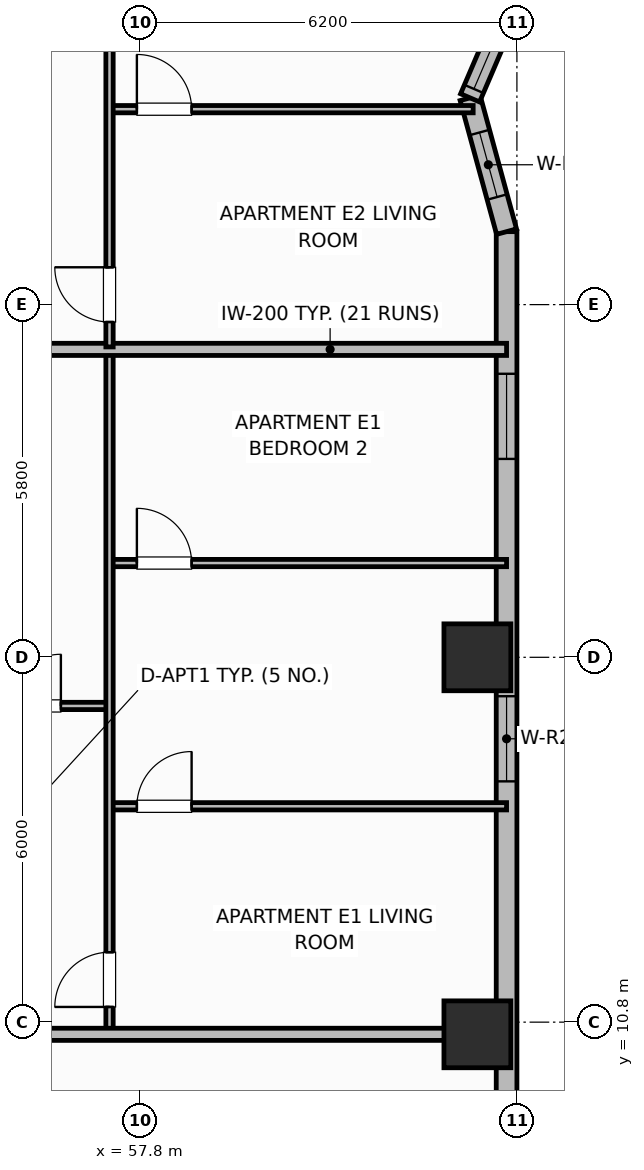
"""IFC4 building model, lengths in metres.
Left out: names, types, materials, properties, quantities, classifications, styles, units other than length and angle.
Written with IfcOpenShell. Run it as: python <this file> out.ifc"""

import sys

from ifc_helpers import new_model, si_unit, direction, frame, frame_2d, origin, origin_2d, place, context, subcontext, project, spatial, rectangle, extrude, element, fill, save


model = new_model("IFC4")
c1 = context("Model", 3, precision=1e-05, world=origin(), true_north=direction((0.0, 1.0)))
c2 = subcontext(c1, "Body", "Model", "MODEL_VIEW")
j1 = project(units=[si_unit("LENGTHUNIT", "METRE"), si_unit("PLANEANGLEUNIT", "RADIAN")], contexts=[c1])
p1 = place(None, origin())
s1 = spatial("IfcSite", under=j1, at=p1, CompositionType="ELEMENT")
p2 = place(p1, origin())
s2 = spatial("IfcBuilding", under=s1, at=p2, CompositionType="ELEMENT")
p3 = place(p2, frame((0.0, 0.0, 88.3)))
s3 = spatial("IfcBuildingStorey", under=s2, at=p3, CompositionType="ELEMENT", Elevation=88.3)
for number, where, z_axis, x_axis in (
    (1, (63.35, 10.6, 0.0), (0.0, 0.0, 1.0), (1.0, 0.0, 0.0)),
    (2, (63.35, 16.8, 0.0), (0.0, 0.0, 1.0), (1.0, 0.0, 0.0)),
):
    element("IfcColumn", number, at=place(p3, frame(where, z_axis=z_axis, x_axis=x_axis)), inside=s3, PredefinedType="COLUMN", context=c2, shape_type="SweptSolid", body=[
        extrude(rectangle(XDim=1.1, YDim=1.1, at=origin_2d()), origin(), (0.0, 0.0, 1.0), 3.7),
    ])
p4 = place(p3, frame((63.83, 9.0, 0.0), z_axis=(0.0, 0.0, 1.0), x_axis=(0.0, 1.0, 0.0)))
e3 = element("IfcWall", 3, at=p4, inside=s3, PredefinedType="SOLIDWALL", context=c2, shape_type="SweptSolid", body=[
    extrude(rectangle(XDim=14.8, YDim=0.34, at=frame_2d((7.4, 0.0))), origin(), (0.0, 0.0, 1.0), 2.7),
])
p5 = place(p4, frame((5.76, 0.0, 0.69)))
e4 = element("IfcOpeningElement", 4, at=p5, cuts=e3, PredefinedType="OPENING", context=c2, shape_type="SweptSolid", body=[
    extrude(rectangle(XDim=1.4, YDim=1.85, at=frame_2d((0.7, 0.925))), frame((0.0, 0.18, 0.0), z_axis=(0.0, -1.0, 0.0), x_axis=(1.0, 0.0, 0.0)), (0.0, 0.0, 1.0), 0.36),
])
p6 = place(p4, frame((11.062, 0.0, 0.73)))
e5 = element("IfcOpeningElement", 5, at=p6, cuts=e3, PredefinedType="OPENING", context=c2, shape_type="SweptSolid", body=[
    extrude(rectangle(XDim=1.4, YDim=1.85, at=frame_2d((0.7, 0.925))), frame((0.0, 0.18, 0.0), z_axis=(0.0, -1.0, 0.0), x_axis=(1.0, 0.0, 0.0)), (0.0, 0.0, 1.0), 0.36),
])
p7 = place(p3, frame((63.83, 23.8, 0.0), z_axis=(0.0, 0.0, 1.0), x_axis=(-0.263162701705, 0.964751466665, 0.0)))
e6 = element("IfcWall", 6, at=p7, inside=s3, PredefinedType="SOLIDWALL", context=c2, shape_type="SweptSolid", body=[
    extrude(rectangle(XDim=2.28, YDim=0.34, at=frame_2d((1.14, 0.0))), origin(), (0.0, 0.0, 1.0), 2.7),
])
p8 = place(p7, frame((0.59, 0.0, 0.89)))
e7 = element("IfcOpeningElement", 7, at=p8, cuts=e6, PredefinedType="OPENING", context=c2, shape_type="SweptSolid", body=[
    extrude(rectangle(XDim=1.1, YDim=1.65, at=frame_2d((0.55, 0.825))), frame((0.0, 0.18, 0.0), z_axis=(0.0, -1.0, 0.0), x_axis=(1.0, 0.0, 0.0)), (0.0, 0.0, 1.0), 0.36),
])
p9 = place(p3, frame((63.23, 26.0, 0.0), z_axis=(0.0, 0.0, 1.0), x_axis=(0.39399667932, 0.919111862988, 0.0)))
e8 = element("IfcWall", 8, at=p9, inside=s3, PredefinedType="SOLIDWALL", context=c2, shape_type="SweptSolid", body=[
    extrude(rectangle(XDim=1.523, YDim=0.34, at=frame_2d((0.762, 0.0))), origin(), (0.0, 0.0, 1.0), 2.7),
])
p10 = place(p9, frame((0.16, 0.0, 0.89)))
e9 = element("IfcOpeningElement", 9, at=p10, cuts=e8, PredefinedType="OPENING", context=c2, shape_type="SweptSolid", body=[
    extrude(rectangle(XDim=1.1, YDim=1.65, at=frame_2d((0.55, 0.825))), frame((0.0, 0.18, 0.0), z_axis=(0.0, -1.0, 0.0), x_axis=(1.0, 0.0, 0.0)), (0.0, 0.0, 1.0), 0.36),
])
p11 = place(p3, frame((55.05, 16.0, 0.0), z_axis=(0.0, 0.0, 1.0), x_axis=(1.0, 0.0, 0.0)))
e10 = element("IfcWall", 10, at=p11, inside=s3, PredefinedType="PARTITIONING", context=c2, shape_type="SweptSolid", body=[
    extrude(rectangle(XDim=2.25, YDim=0.12, at=frame_2d((1.125, 0.0))), origin(), (0.0, 0.0, 1.0), 2.53),
])
p12 = place(p11, frame((0.6, 0.0, 0.0)))
e11 = element("IfcOpeningElement", 11, at=p12, cuts=e10, PredefinedType="OPENING", context=c2, shape_type="SweptSolid", body=[
    extrude(rectangle(XDim=0.85, YDim=2.1, at=frame_2d((0.425, 1.05))), frame((0.0, 0.07, 0.0), z_axis=(0.0, -1.0, 0.0), x_axis=(1.0, 0.0, 0.0)), (0.0, 0.0, 1.0), 0.14),
])
p13 = place(p3, frame((57.3, 14.35, 0.0), z_axis=(0.0, 0.0, 1.0), x_axis=(1.0, 0.0, 0.0)))
e12 = element("IfcWall", 12, at=p13, inside=s3, PredefinedType="PARTITIONING", context=c2, shape_type="SweptSolid", body=[
    extrude(rectangle(XDim=6.53, YDim=0.12, at=frame_2d((3.265, 0.0))), origin(), (0.0, 0.0, 1.0), 2.53),
])
p14 = place(p13, frame((0.45, 0.0, 0.0)))
e13 = element("IfcOpeningElement", 13, at=p14, cuts=e12, PredefinedType="OPENING", context=c2, shape_type="SweptSolid", body=[
    extrude(rectangle(XDim=0.9, YDim=2.1, at=frame_2d((0.45, 1.05))), frame((0.0, 0.07, 0.0), z_axis=(0.0, -1.0, 0.0), x_axis=(1.0, 0.0, 0.0)), (0.0, 0.0, 1.0), 0.14),
])
p15 = place(p3, frame((57.3, 18.35, 0.0), z_axis=(0.0, 0.0, 1.0), x_axis=(1.0, 0.0, 0.0)))
e14 = element("IfcWall", 14, at=p15, inside=s3, PredefinedType="PARTITIONING", context=c2, shape_type="SweptSolid", body=[
    extrude(rectangle(XDim=6.53, YDim=0.12, at=frame_2d((3.265, 0.0))), origin(), (0.0, 0.0, 1.0), 2.53),
])
p16 = place(p15, frame((0.45, 0.0, 0.0)))
e15 = element("IfcOpeningElement", 15, at=p16, cuts=e14, PredefinedType="OPENING", context=c2, shape_type="SweptSolid", body=[
    extrude(rectangle(XDim=0.9, YDim=2.1, at=frame_2d((0.45, 1.05))), frame((0.0, 0.07, 0.0), z_axis=(0.0, -1.0, 0.0), x_axis=(1.0, 0.0, 0.0)), (0.0, 0.0, 1.0), 0.14),
])
p17 = place(p3, frame((57.3, 10.64, 0.0), z_axis=(0.0, 0.0, 1.0), x_axis=(0.0, 1.0, 0.0)))
e16 = element("IfcWall", 16, at=p17, inside=s3, PredefinedType="PARTITIONING", context=c2, shape_type="SweptSolid", body=[
    extrude(rectangle(XDim=11.184, YDim=0.12, at=frame_2d((5.592, 0.0))), origin(), (0.0, 0.0, 1.0), 2.53),
])
p18 = place(p17, frame((0.41, 0.0, 0.0)))
e17 = element("IfcOpeningElement", 17, at=p18, cuts=e16, PredefinedType="OPENING", context=c2, shape_type="SweptSolid", body=[
    extrude(rectangle(XDim=0.9, YDim=2.1, at=frame_2d((0.45, 1.05))), frame((0.0, 0.07, 0.0), z_axis=(0.0, -1.0, 0.0), x_axis=(1.0, 0.0, 0.0)), (0.0, 0.0, 1.0), 0.14),
])
p19 = place(p3, frame((55.05, 21.864, 0.0), z_axis=(0.0, 0.0, 1.0), x_axis=(1.0, 0.0, 0.0)))
e18 = element("IfcWall", 18, at=p19, inside=s3, PredefinedType="PARTITIONING", context=c2, shape_type="SweptSolid", body=[
    extrude(rectangle(XDim=8.78, YDim=0.2, at=frame_2d((4.39, 0.0))), origin(), (0.0, 0.0, 1.0), 2.53),
])
p20 = place(p3, frame((57.3, 25.814, 0.0), z_axis=(0.0, 0.0, 1.0), x_axis=(1.0, 0.0, 0.0)))
e19 = element("IfcWall", 19, at=p20, inside=s3, PredefinedType="PARTITIONING", context=c2, shape_type="SweptSolid", body=[
    extrude(rectangle(XDim=5.981, YDim=0.12, at=frame_2d((2.99, 0.0))), origin(), (0.0, 0.0, 1.0), 2.53),
])
p21 = place(p20, frame((0.45, 0.0, 0.0)))
e20 = element("IfcOpeningElement", 20, at=p21, cuts=e19, PredefinedType="OPENING", context=c2, shape_type="SweptSolid", body=[
    extrude(rectangle(XDim=0.9, YDim=2.1, at=frame_2d((0.45, 1.05))), frame((0.0, 0.07, 0.0), z_axis=(0.0, -1.0, 0.0), x_axis=(1.0, 0.0, 0.0)), (0.0, 0.0, 1.0), 0.14),
])
p22 = place(p3, frame((57.3, 21.904, 0.0), z_axis=(0.0, 0.0, 1.0), x_axis=(0.0, 1.0, 0.0)))
e21 = element("IfcWall", 21, at=p22, inside=s3, PredefinedType="PARTITIONING", context=c2, shape_type="SweptSolid", body=[
    extrude(rectangle(XDim=11.756, YDim=0.12, at=frame_2d((5.878, 0.0))), origin(), (0.0, 0.0, 1.0), 2.53),
])
p23 = place(p22, frame((0.41, 0.0, 0.0)))
e22 = element("IfcOpeningElement", 22, at=p23, cuts=e21, PredefinedType="OPENING", context=c2, shape_type="SweptSolid", body=[
    extrude(rectangle(XDim=0.9, YDim=2.1, at=frame_2d((0.45, 1.05))), frame((0.0, 0.07, 0.0), z_axis=(0.0, -1.0, 0.0), x_axis=(1.0, 0.0, 0.0)), (0.0, 0.0, 1.0), 0.14),
])
p24 = place(p3, frame((55.05, 10.6, 0.0), z_axis=(0.0, 0.0, 1.0), x_axis=(1.0, 0.0, 0.0)))
e23 = element("IfcWall", 23, at=p24, inside=s3, PredefinedType="PARTITIONING", context=c2, shape_type="SweptSolid", body=[
    extrude(rectangle(XDim=8.36, YDim=0.2, at=frame_2d((4.18, 0.0))), origin(), (0.0, 0.0, 1.0), 2.53),
])
p25 = place(p5, origin())
e24 = element("IfcWindow", 24, at=p25, inside=s3, PartitioningType="SINGLE_PANEL", PredefinedType="WINDOW", context=c2, shape_type="SweptSolid", body=[
    extrude(rectangle(XDim=1.4, YDim=1.85, at=frame_2d((0.7, 0.925))), frame((0.0, 0.03, 0.0), z_axis=(0.0, -1.0, 0.0), x_axis=(1.0, 0.0, 0.0)), (0.0, 0.0, 1.0), 0.06),
])
fill(e4, e24)
p26 = place(p6, origin())
e25 = element("IfcWindow", 25, at=p26, inside=s3, PartitioningType="SINGLE_PANEL", PredefinedType="WINDOW", context=c2, shape_type="SweptSolid", body=[
    extrude(rectangle(XDim=1.4, YDim=1.85, at=frame_2d((0.7, 0.925))), frame((0.0, 0.03, 0.0), z_axis=(0.0, -1.0, 0.0), x_axis=(1.0, 0.0, 0.0)), (0.0, 0.0, 1.0), 0.06),
])
fill(e5, e25)
p27 = place(p8, origin())
e26 = element("IfcWindow", 26, at=p27, inside=s3, PartitioningType="SINGLE_PANEL", PredefinedType="WINDOW", context=c2, shape_type="SweptSolid", body=[
    extrude(rectangle(XDim=1.1, YDim=1.65, at=frame_2d((0.55, 0.825))), frame((0.0, 0.03, 0.0), z_axis=(0.0, -1.0, 0.0), x_axis=(1.0, 0.0, 0.0)), (0.0, 0.0, 1.0), 0.06),
])
fill(e7, e26)
p28 = place(p10, origin())
e27 = element("IfcWindow", 27, at=p28, inside=s3, PartitioningType="SINGLE_PANEL", PredefinedType="WINDOW", context=c2, shape_type="SweptSolid", body=[
    extrude(rectangle(XDim=1.1, YDim=1.65, at=frame_2d((0.55, 0.825))), frame((0.0, 0.03, 0.0), z_axis=(0.0, -1.0, 0.0), x_axis=(1.0, 0.0, 0.0)), (0.0, 0.0, 1.0), 0.06),
])
fill(e9, e27)
p29 = place(p12, origin())
e28 = element("IfcDoor", 28, at=p29, inside=s3, OperationType="SINGLE_SWING_RIGHT", PredefinedType="DOOR", context=c2, shape_type="SweptSolid", body=[
    extrude(rectangle(XDim=0.85, YDim=2.1, at=frame_2d((0.425, 1.05))), frame((0.0, 0.025, 0.0), z_axis=(0.0, -1.0, 0.0), x_axis=(1.0, 0.0, 0.0)), (0.0, 0.0, 1.0), 0.05),
])
fill(e11, e28)
p30 = place(p14, origin())
e29 = element("IfcDoor", 29, at=p30, inside=s3, OperationType="SINGLE_SWING_RIGHT", PredefinedType="DOOR", context=c2, shape_type="SweptSolid", body=[
    extrude(rectangle(XDim=0.9, YDim=2.1, at=frame_2d((0.45, 1.05))), frame((0.0, 0.025, 0.0), z_axis=(0.0, -1.0, 0.0), x_axis=(1.0, 0.0, 0.0)), (0.0, 0.0, 1.0), 0.05),
])
fill(e13, e29)
p31 = place(p16, origin())
e30 = element("IfcDoor", 30, at=p31, inside=s3, OperationType="SINGLE_SWING_LEFT", PredefinedType="DOOR", context=c2, shape_type="SweptSolid", body=[
    extrude(rectangle(XDim=0.9, YDim=2.1, at=frame_2d((0.45, 1.05))), frame((0.0, 0.025, 0.0), z_axis=(0.0, -1.0, 0.0), x_axis=(1.0, 0.0, 0.0)), (0.0, 0.0, 1.0), 0.05),
])
fill(e15, e30)
p32 = place(p18, origin())
e31 = element("IfcDoor", 31, at=p32, inside=s3, OperationType="SINGLE_SWING_LEFT", PredefinedType="DOOR", context=c2, shape_type="SweptSolid", body=[
    extrude(rectangle(XDim=0.9, YDim=2.1, at=frame_2d((0.45, 1.05))), frame((0.0, 0.025, 0.0), z_axis=(0.0, -1.0, 0.0), x_axis=(1.0, 0.0, 0.0)), (0.0, 0.0, 1.0), 0.05),
])
fill(e17, e31)
p33 = place(p21, origin())
e32 = element("IfcDoor", 32, at=p33, inside=s3, OperationType="SINGLE_SWING_LEFT", PredefinedType="DOOR", context=c2, shape_type="SweptSolid", body=[
    extrude(rectangle(XDim=0.9, YDim=2.1, at=frame_2d((0.45, 1.05))), frame((0.0, 0.025, 0.0), z_axis=(0.0, -1.0, 0.0), x_axis=(1.0, 0.0, 0.0)), (0.0, 0.0, 1.0), 0.05),
])
fill(e20, e32)
p34 = place(p23, origin())
e33 = element("IfcDoor", 33, at=p34, inside=s3, OperationType="SINGLE_SWING_RIGHT", PredefinedType="DOOR", context=c2, shape_type="SweptSolid", body=[
    extrude(rectangle(XDim=0.9, YDim=2.1, at=frame_2d((0.45, 1.05))), frame((0.0, 0.025, 0.0), z_axis=(0.0, -1.0, 0.0), x_axis=(1.0, 0.0, 0.0)), (0.0, 0.0, 1.0), 0.05),
])
fill(e22, e33)
save(model, sys.argv[1])
